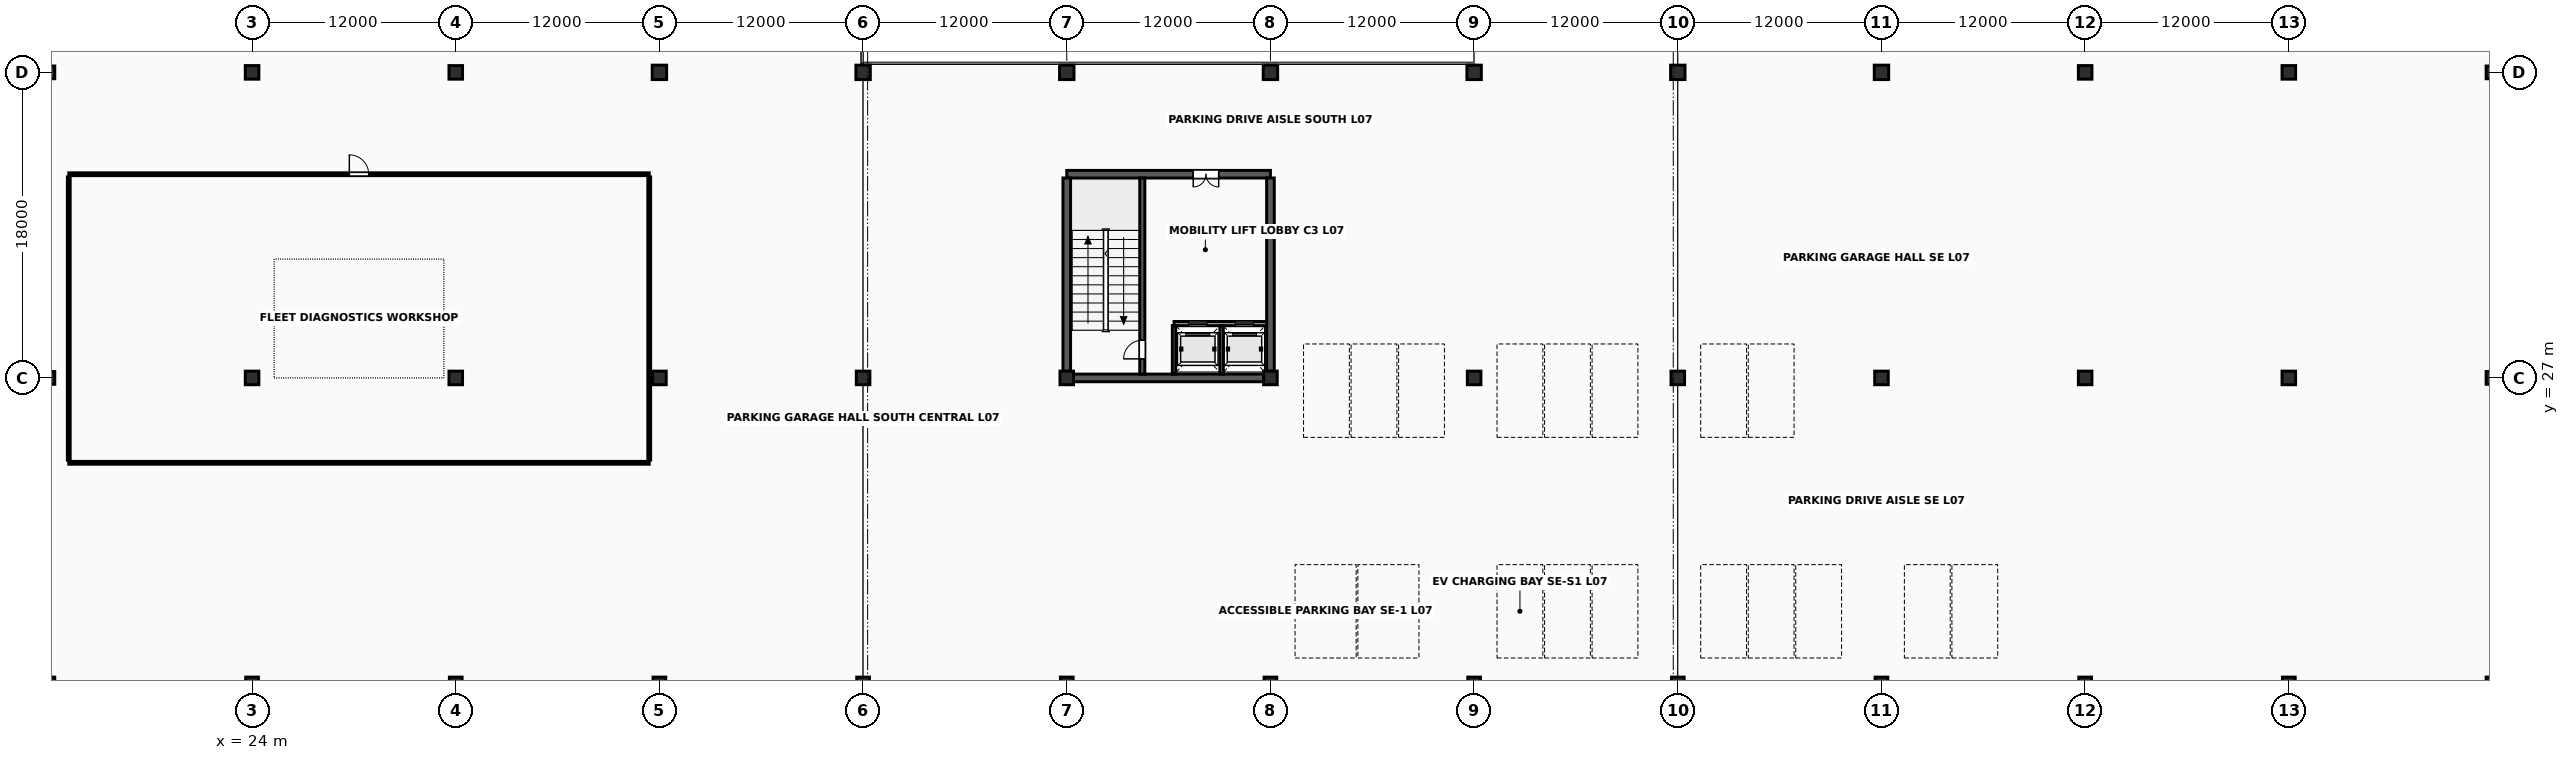
"""IFC4 building model, lengths in metres.
Left out: names, types, materials, properties, quantities, classifications, styles, units other than length and angle.
Written with IfcOpenShell. Run it as: python <this file> out.ifc"""

import sys

from ifc_helpers import new_model, si_unit, direction, frame, frame_2d, origin, origin_2d, place, context, subcontext, project, spatial, rectangle, extrude, element, fill, save


model = new_model("IFC4")
c1 = context("Model", 3, precision=1e-05, world=origin(), true_north=direction((0.0, 1.0)))
c2 = subcontext(c1, "Body", "Model", "MODEL_VIEW")
j1 = project(units=[si_unit("LENGTHUNIT", "METRE"), si_unit("PLANEANGLEUNIT", "RADIAN")], contexts=[c1])
p1 = place(None, origin())
s1 = spatial("IfcSite", under=j1, at=p1, CompositionType="ELEMENT")
p2 = place(p1, origin())
s2 = spatial("IfcBuilding", under=s1, at=p2, CompositionType="ELEMENT")
p3 = place(p2, frame((0.0, 0.0, 28.6)))
s3 = spatial("IfcBuildingStorey", under=s2, at=p3, CompositionType="ELEMENT", Elevation=28.6)
for number, where, z_axis, x_axis in (
    (1, (12.0, 9.0, 0.0), (0.0, 0.0, 1.0), (1.0, 0.0, 0.0)),
    (2, (12.0, 27.0, 0.0), (0.0, 0.0, 1.0), (1.0, 0.0, 0.0)),
    (3, (12.0, 45.0, 0.0), (0.0, 0.0, 1.0), (1.0, 0.0, 0.0)),
    (4, (24.0, 9.0, 0.0), (0.0, 0.0, 1.0), (1.0, 0.0, 0.0)),
):
    element("IfcColumn", number, at=place(p3, frame(where, z_axis=z_axis, x_axis=x_axis)), inside=s3, PredefinedType="COLUMN", context=c2, shape_type="SweptSolid", body=[
        extrude(rectangle(XDim=0.75, YDim=0.75, at=origin_2d()), origin(), (0.0, 0.0, 1.0), 3.8),
    ])
for number, where, z_axis, x_axis in (
    (5, (24.0, 27.0, 0.0), (0.0, 0.0, 1.0), (1.0, 0.0, 0.0)),
    (6, (24.0, 45.0, 0.0), (0.0, 0.0, 1.0), (1.0, 0.0, 0.0)),
):
    element("IfcColumn", number, at=place(p3, frame(where, z_axis=z_axis, x_axis=x_axis)), inside=s3, PredefinedType="COLUMN", context=c2, shape_type="SweptSolid", body=[
        extrude(rectangle(XDim=0.8, YDim=0.8, at=origin_2d()), origin(), (0.0, 0.0, 1.0), 3.8),
    ])
p4 = place(p3, frame((36.0, 9.0, 0.0), z_axis=(0.0, 0.0, 1.0), x_axis=(1.0, 0.0, 0.0)))
e7 = element("IfcColumn", 7, at=p4, inside=s3, PredefinedType="COLUMN", context=c2, shape_type="SweptSolid", body=[
    extrude(rectangle(XDim=0.75, YDim=0.75, at=origin_2d()), origin(), (0.0, 0.0, 1.0), 3.8),
])
for number, where, z_axis, x_axis in (
    (8, (36.0, 27.0, 0.0), (0.0, 0.0, 1.0), (1.0, 0.0, 0.0)),
    (9, (36.0, 45.0, 0.0), (0.0, 0.0, 1.0), (1.0, 0.0, 0.0)),
):
    element("IfcColumn", number, at=place(p3, frame(where, z_axis=z_axis, x_axis=x_axis)), inside=s3, PredefinedType="COLUMN", context=c2, shape_type="SweptSolid", body=[
        extrude(rectangle(XDim=0.8, YDim=0.8, at=origin_2d()), origin(), (0.0, 0.0, 1.0), 3.8),
    ])
p5 = place(p3, frame((48.0, 9.0, 0.0), z_axis=(0.0, 0.0, 1.0), x_axis=(1.0, 0.0, 0.0)))
e10 = element("IfcColumn", 10, at=p5, inside=s3, PredefinedType="COLUMN", context=c2, shape_type="SweptSolid", body=[
    extrude(rectangle(XDim=0.75, YDim=0.75, at=origin_2d()), origin(), (0.0, 0.0, 1.0), 3.8),
])
p6 = place(p3, frame((48.0, 27.0, 0.0), z_axis=(0.0, 0.0, 1.0), x_axis=(1.0, 0.0, 0.0)))
e11 = element("IfcColumn", 11, at=p6, inside=s3, PredefinedType="COLUMN", context=c2, shape_type="SweptSolid", body=[
    extrude(rectangle(XDim=0.8, YDim=0.8, at=origin_2d()), origin(), (0.0, 0.0, 1.0), 3.8),
])
p7 = place(p3, frame((48.0, 45.0, 0.0), z_axis=(0.0, 0.0, 1.0), x_axis=(1.0, 0.0, 0.0)))
e12 = element("IfcColumn", 12, at=p7, inside=s3, PredefinedType="COLUMN", context=c2, shape_type="SweptSolid", body=[
    extrude(rectangle(XDim=0.85, YDim=0.85, at=origin_2d()), origin(), (0.0, 0.0, 1.0), 3.8),
])
p8 = place(p3, frame((60.0, 9.0, 0.0), z_axis=(0.0, 0.0, 1.0), x_axis=(1.0, 0.0, 0.0)))
e13 = element("IfcColumn", 13, at=p8, inside=s3, PredefinedType="COLUMN", context=c2, shape_type="SweptSolid", body=[
    extrude(rectangle(XDim=0.75, YDim=0.75, at=origin_2d()), origin(), (0.0, 0.0, 1.0), 3.8),
])
p9 = place(p3, frame((60.0, 27.0, 0.0), z_axis=(0.0, 0.0, 1.0), x_axis=(1.0, 0.0, 0.0)))
e14 = element("IfcColumn", 14, at=p9, inside=s3, PredefinedType="COLUMN", context=c2, shape_type="SweptSolid", body=[
    extrude(rectangle(XDim=0.8, YDim=0.8, at=origin_2d()), origin(), (0.0, 0.0, 1.0), 3.8),
])
p10 = place(p3, frame((60.0, 45.0, 0.0), z_axis=(0.0, 0.0, 1.0), x_axis=(1.0, 0.0, 0.0)))
e15 = element("IfcColumn", 15, at=p10, inside=s3, PredefinedType="COLUMN", context=c2, shape_type="SweptSolid", body=[
    extrude(rectangle(XDim=0.85, YDim=0.85, at=origin_2d()), origin(), (0.0, 0.0, 1.0), 3.8),
])
p11 = place(p3, frame((72.0, 9.0, 0.0), z_axis=(0.0, 0.0, 1.0), x_axis=(1.0, 0.0, 0.0)))
e16 = element("IfcColumn", 16, at=p11, inside=s3, PredefinedType="COLUMN", context=c2, shape_type="SweptSolid", body=[
    extrude(rectangle(XDim=0.75, YDim=0.75, at=origin_2d()), origin(), (0.0, 0.0, 1.0), 3.8),
])
p12 = place(p3, frame((72.0, 27.0, 0.0), z_axis=(0.0, 0.0, 1.0), x_axis=(1.0, 0.0, 0.0)))
e17 = element("IfcColumn", 17, at=p12, inside=s3, PredefinedType="COLUMN", context=c2, shape_type="SweptSolid", body=[
    extrude(rectangle(XDim=0.8, YDim=0.8, at=origin_2d()), origin(), (0.0, 0.0, 1.0), 3.8),
])
p13 = place(p3, frame((72.0, 45.0, 0.0), z_axis=(0.0, 0.0, 1.0), x_axis=(1.0, 0.0, 0.0)))
e18 = element("IfcColumn", 18, at=p13, inside=s3, PredefinedType="COLUMN", context=c2, shape_type="SweptSolid", body=[
    extrude(rectangle(XDim=0.85, YDim=0.85, at=origin_2d()), origin(), (0.0, 0.0, 1.0), 3.8),
])
p14 = place(p3, frame((84.0, 9.0, 0.0), z_axis=(0.0, 0.0, 1.0), x_axis=(1.0, 0.0, 0.0)))
e19 = element("IfcColumn", 19, at=p14, inside=s3, PredefinedType="COLUMN", context=c2, shape_type="SweptSolid", body=[
    extrude(rectangle(XDim=0.75, YDim=0.75, at=origin_2d()), origin(), (0.0, 0.0, 1.0), 3.8),
])
p15 = place(p3, frame((84.0, 27.0, 0.0), z_axis=(0.0, 0.0, 1.0), x_axis=(1.0, 0.0, 0.0)))
e20 = element("IfcColumn", 20, at=p15, inside=s3, PredefinedType="COLUMN", context=c2, shape_type="SweptSolid", body=[
    extrude(rectangle(XDim=0.8, YDim=0.8, at=origin_2d()), origin(), (0.0, 0.0, 1.0), 3.8),
])
p16 = place(p3, frame((84.0, 45.0, 0.0), z_axis=(0.0, 0.0, 1.0), x_axis=(1.0, 0.0, 0.0)))
e21 = element("IfcColumn", 21, at=p16, inside=s3, PredefinedType="COLUMN", context=c2, shape_type="SweptSolid", body=[
    extrude(rectangle(XDim=0.85, YDim=0.85, at=origin_2d()), origin(), (0.0, 0.0, 1.0), 3.8),
])
p17 = place(p3, frame((96.0, 9.0, 0.0), z_axis=(0.0, 0.0, 1.0), x_axis=(1.0, 0.0, 0.0)))
e22 = element("IfcColumn", 22, at=p17, inside=s3, PredefinedType="COLUMN", context=c2, shape_type="SweptSolid", body=[
    extrude(rectangle(XDim=0.75, YDim=0.75, at=origin_2d()), origin(), (0.0, 0.0, 1.0), 3.8),
])
p18 = place(p3, frame((96.0, 27.0, 0.0), z_axis=(0.0, 0.0, 1.0), x_axis=(1.0, 0.0, 0.0)))
e23 = element("IfcColumn", 23, at=p18, inside=s3, PredefinedType="COLUMN", context=c2, shape_type="SweptSolid", body=[
    extrude(rectangle(XDim=0.8, YDim=0.8, at=origin_2d()), origin(), (0.0, 0.0, 1.0), 3.8),
])
p19 = place(p3, frame((96.0, 45.0, 0.0), z_axis=(0.0, 0.0, 1.0), x_axis=(1.0, 0.0, 0.0)))
e24 = element("IfcColumn", 24, at=p19, inside=s3, PredefinedType="COLUMN", context=c2, shape_type="SweptSolid", body=[
    extrude(rectangle(XDim=0.85, YDim=0.85, at=origin_2d()), origin(), (0.0, 0.0, 1.0), 3.8),
])
p20 = place(p3, frame((108.0, 9.0, 0.0), z_axis=(0.0, 0.0, 1.0), x_axis=(1.0, 0.0, 0.0)))
e25 = element("IfcColumn", 25, at=p20, inside=s3, PredefinedType="COLUMN", context=c2, shape_type="SweptSolid", body=[
    extrude(rectangle(XDim=0.75, YDim=0.75, at=origin_2d()), origin(), (0.0, 0.0, 1.0), 3.8),
])
p21 = place(p3, frame((108.0, 27.0, 0.0), z_axis=(0.0, 0.0, 1.0), x_axis=(1.0, 0.0, 0.0)))
e26 = element("IfcColumn", 26, at=p21, inside=s3, PredefinedType="COLUMN", context=c2, shape_type="SweptSolid", body=[
    extrude(rectangle(XDim=0.8, YDim=0.8, at=origin_2d()), origin(), (0.0, 0.0, 1.0), 3.8),
])
p22 = place(p3, frame((108.0, 45.0, 0.0), z_axis=(0.0, 0.0, 1.0), x_axis=(1.0, 0.0, 0.0)))
e27 = element("IfcColumn", 27, at=p22, inside=s3, PredefinedType="COLUMN", context=c2, shape_type="SweptSolid", body=[
    extrude(rectangle(XDim=0.85, YDim=0.85, at=origin_2d()), origin(), (0.0, 0.0, 1.0), 3.8),
])
p23 = place(p3, frame((120.0, 9.0, 0.0), z_axis=(0.0, 0.0, 1.0), x_axis=(1.0, 0.0, 0.0)))
e28 = element("IfcColumn", 28, at=p23, inside=s3, PredefinedType="COLUMN", context=c2, shape_type="SweptSolid", body=[
    extrude(rectangle(XDim=0.75, YDim=0.75, at=origin_2d()), origin(), (0.0, 0.0, 1.0), 3.8),
])
p24 = place(p3, frame((120.0, 27.0, 0.0), z_axis=(0.0, 0.0, 1.0), x_axis=(1.0, 0.0, 0.0)))
e29 = element("IfcColumn", 29, at=p24, inside=s3, PredefinedType="COLUMN", context=c2, shape_type="SweptSolid", body=[
    extrude(rectangle(XDim=0.8, YDim=0.8, at=origin_2d()), origin(), (0.0, 0.0, 1.0), 3.8),
])
p25 = place(p3, frame((120.0, 45.0, 0.0), z_axis=(0.0, 0.0, 1.0), x_axis=(1.0, 0.0, 0.0)))
e30 = element("IfcColumn", 30, at=p25, inside=s3, PredefinedType="COLUMN", context=c2, shape_type="SweptSolid", body=[
    extrude(rectangle(XDim=0.85, YDim=0.85, at=origin_2d()), origin(), (0.0, 0.0, 1.0), 3.8),
])
p26 = place(p3, frame((132.0, 9.0, 0.0), z_axis=(0.0, 0.0, 1.0), x_axis=(1.0, 0.0, 0.0)))
e31 = element("IfcColumn", 31, at=p26, inside=s3, PredefinedType="COLUMN", context=c2, shape_type="SweptSolid", body=[
    extrude(rectangle(XDim=0.75, YDim=0.75, at=origin_2d()), origin(), (0.0, 0.0, 1.0), 3.8),
])
for number, where, z_axis, x_axis in (
    (32, (132.0, 27.0, 0.0), (0.0, 0.0, 1.0), (1.0, 0.0, 0.0)),
    (33, (132.0, 45.0, 0.0), (0.0, 0.0, 1.0), (1.0, 0.0, 0.0)),
):
    element("IfcColumn", number, at=place(p3, frame(where, z_axis=z_axis, x_axis=x_axis)), inside=s3, PredefinedType="COLUMN", context=c2, shape_type="SweptSolid", body=[
        extrude(rectangle(XDim=0.8, YDim=0.8, at=origin_2d()), origin(), (0.0, 0.0, 1.0), 3.8),
    ])
p27 = place(p3, frame((144.0, 9.0, 0.0), z_axis=(0.0, 0.0, 1.0), x_axis=(1.0, 0.0, 0.0)))
e34 = element("IfcColumn", 34, at=p27, inside=s3, PredefinedType="COLUMN", context=c2, shape_type="SweptSolid", body=[
    extrude(rectangle(XDim=0.75, YDim=0.75, at=origin_2d()), origin(), (0.0, 0.0, 1.0), 3.8),
])
for number, where, z_axis, x_axis in (
    (35, (144.0, 27.0, 0.0), (0.0, 0.0, 1.0), (1.0, 0.0, 0.0)),
    (36, (144.0, 45.0, 0.0), (0.0, 0.0, 1.0), (1.0, 0.0, 0.0)),
):
    element("IfcColumn", number, at=place(p3, frame(where, z_axis=z_axis, x_axis=x_axis)), inside=s3, PredefinedType="COLUMN", context=c2, shape_type="SweptSolid", body=[
        extrude(rectangle(XDim=0.8, YDim=0.8, at=origin_2d()), origin(), (0.0, 0.0, 1.0), 3.8),
    ])
for number, where, z_axis, x_axis in (
    (37, (156.0, 9.0, 0.0), (0.0, 0.0, 1.0), (1.0, 0.0, 0.0)),
    (38, (156.0, 27.0, 0.0), (0.0, 0.0, 1.0), (1.0, 0.0, 0.0)),
    (39, (156.0, 45.0, 0.0), (0.0, 0.0, 1.0), (1.0, 0.0, 0.0)),
):
    element("IfcColumn", number, at=place(p3, frame(where, z_axis=z_axis, x_axis=x_axis)), inside=s3, PredefinedType="COLUMN", context=c2, shape_type="SweptSolid", body=[
        extrude(rectangle(XDim=0.75, YDim=0.75, at=origin_2d()), origin(), (0.0, 0.0, 1.0), 3.8),
    ])
p28 = place(p3, frame((72.397, 27.0, 0.0), z_axis=(0.0, 0.0, 1.0), x_axis=(1.0, 0.0, 0.0)))
e40 = element("IfcWall", 40, at=p28, inside=s3, PredefinedType="SHEAR", context=c2, shape_type="SweptSolid", body=[
    extrude(rectangle(XDim=11.206, YDim=0.45, at=frame_2d((5.603, 0.0))), origin(), (0.0, 0.0, 1.0), 3.553),
])
p29 = place(p3, frame((72.0, 39.0, 0.0), z_axis=(0.0, 0.0, 1.0), x_axis=(1.0, 0.0, 0.0)))
e41 = element("IfcWall", 41, at=p29, inside=s3, PredefinedType="SHEAR", context=c2, shape_type="SweptSolid", body=[
    extrude(rectangle(XDim=12.0, YDim=0.45, at=frame_2d((6.0, 0.0))), origin(), (0.0, 0.0, 1.0), 3.553),
])
p30 = place(p29, frame((7.45, 0.0, 0.0)))
e42 = element("IfcOpeningElement", 42, at=p30, cuts=e41, PredefinedType="OPENING", context=c2, shape_type="SweptSolid", body=[
    extrude(rectangle(XDim=1.5, YDim=2.25, at=frame_2d((0.75, 1.125))), frame((0.0, 0.24, 0.0), z_axis=(0.0, -1.0, 0.0), x_axis=(1.0, 0.0, 0.0)), (0.0, 0.0, 1.0), 0.48),
])
for number, where, z_axis, x_axis in (
    (43, (72.0, 27.397, 0.0), (0.0, 0.0, 1.0), (0.0, 1.0, 0.0)),
    (44, (84.0, 27.397, 0.0), (0.0, 0.0, 1.0), (0.0, 1.0, 0.0)),
):
    element("IfcWall", number, at=place(p3, frame(where, z_axis=z_axis, x_axis=x_axis)), inside=s3, PredefinedType="SHEAR", context=c2, shape_type="SweptSolid", body=[
        extrude(rectangle(XDim=11.381, YDim=0.45, at=frame_2d((5.69, 0.0))), origin(), (0.0, 0.0, 1.0), 3.553),
    ])
p31 = place(p3, frame((76.45, 27.222, 0.0), z_axis=(0.0, 0.0, 1.0), x_axis=(0.0, 1.0, 0.0)))
e45 = element("IfcWall", 45, at=p31, inside=s3, PredefinedType="SHEAR", context=c2, shape_type="SweptSolid", body=[
    extrude(rectangle(XDim=11.556, YDim=0.3, at=frame_2d((5.778, 0.0))), origin(), (0.0, 0.0, 1.0), 3.553),
])
p32 = place(p31, frame((0.9, 0.0, 0.0)))
e46 = element("IfcOpeningElement", 46, at=p32, cuts=e45, PredefinedType="OPENING", context=c2, shape_type="SweptSolid", body=[
    extrude(rectangle(XDim=1.1, YDim=2.2, at=frame_2d((0.55, 1.1))), frame((0.0, 0.165, 0.0), z_axis=(0.0, -1.0, 0.0), x_axis=(1.0, 0.0, 0.0)), (0.0, 0.0, 1.0), 0.33),
])
p33 = place(p3, frame((78.32, 30.2, 0.0), z_axis=(0.0, 0.0, 1.0), x_axis=(1.0, 0.0, 0.0)))
e47 = element("IfcWall", 47, at=p33, inside=s3, PredefinedType="SOLIDWALL", context=c2, shape_type="SweptSolid", body=[
    extrude(rectangle(XDim=5.458, YDim=0.25, at=frame_2d((2.729, 0.0))), origin(), (0.0, 0.0, 1.0), 3.553),
])
p34 = place(p33, frame((0.86, 0.0, 0.0)))
e48 = element("IfcOpeningElement", 48, at=p34, cuts=e47, PredefinedType="OPENING", context=c2, shape_type="SweptSolid", body=[
    extrude(rectangle(XDim=1.08, YDim=2.22, at=frame_2d((0.54, 1.11))), frame((0.0, 0.14, 0.0), z_axis=(0.0, -1.0, 0.0), x_axis=(1.0, 0.0, 0.0)), (0.0, 0.0, 1.0), 0.28),
])
p35 = place(p33, frame((3.61, 0.0, 0.0)))
e49 = element("IfcOpeningElement", 49, at=p35, cuts=e47, PredefinedType="OPENING", context=c2, shape_type="SweptSolid", body=[
    extrude(rectangle(XDim=1.08, YDim=2.22, at=frame_2d((0.54, 1.11))), frame((0.0, 0.14, 0.0), z_axis=(0.0, -1.0, 0.0), x_axis=(1.0, 0.0, 0.0)), (0.0, 0.0, 1.0), 0.28),
])
for number, where, z_axis, x_axis in (
    (50, (78.32, 27.225, 0.0), (0.0, 0.0, 1.0), (0.0, 1.0, 0.0)),
    (51, (81.12, 27.225, 0.0), (0.0, 0.0, 1.0), (0.0, 1.0, 0.0)),
):
    element("IfcWall", number, at=place(p3, frame(where, z_axis=z_axis, x_axis=x_axis)), inside=s3, PredefinedType="SOLIDWALL", context=c2, shape_type="SweptSolid", body=[
        extrude(rectangle(XDim=2.855, YDim=0.2, at=frame_2d((1.427, 0.0))), origin(), (0.0, 0.0, 1.0), 3.543),
    ])
p36 = place(p3, frame((13.2, 22.0, 0.0), z_axis=(0.0, 0.0, 1.0), x_axis=(1.0, 0.0, 0.0)))
e52 = element("IfcWall", 52, at=p36, inside=s3, PredefinedType="PARTITIONING", context=c2, shape_type="SweptSolid", body=[
    extrude(rectangle(XDim=34.2, YDim=0.165, at=frame_2d((17.1, 0.0))), origin(), (0.0, 0.0, 1.0), 2.64),
])
p37 = place(p3, frame((13.2, 39.0, 0.0), z_axis=(0.0, 0.0, 1.0), x_axis=(1.0, 0.0, 0.0)))
e53 = element("IfcWall", 53, at=p37, inside=s3, PredefinedType="PARTITIONING", context=c2, shape_type="SweptSolid", body=[
    extrude(rectangle(XDim=34.2, YDim=0.165, at=frame_2d((17.1, 0.0))), origin(), (0.0, 0.0, 1.0), 2.64),
])
p38 = place(p37, frame((16.53, 0.0, 0.0)))
e54 = element("IfcOpeningElement", 54, at=p38, cuts=e53, PredefinedType="OPENING", context=c2, shape_type="SweptSolid", body=[
    extrude(rectangle(XDim=1.14, YDim=2.24, at=frame_2d((0.57, 1.12))), frame((0.0, 0.097, 0.0), z_axis=(0.0, -1.0, 0.0), x_axis=(1.0, 0.0, 0.0)), (0.0, 0.0, 1.0), 0.195),
])
for number, where, z_axis, x_axis in (
    (55, (13.2, 22.16, 0.0), (0.0, 0.0, 1.0), (0.0, 1.0, 0.0)),
    (56, (47.4, 22.16, 0.0), (0.0, 0.0, 1.0), (0.0, 1.0, 0.0)),
):
    element("IfcWall", number, at=place(p3, frame(where, z_axis=z_axis, x_axis=x_axis)), inside=s3, PredefinedType="PARTITIONING", context=c2, shape_type="SweptSolid", body=[
        extrude(rectangle(XDim=16.68, YDim=0.165, at=frame_2d((8.34, 0.0))), origin(), (0.0, 0.0, 1.0), 2.64),
    ])
p39 = place(p32, origin())
e57 = element("IfcDoor", 57, at=p39, inside=s3, OperationType="SINGLE_SWING_LEFT", PredefinedType="DOOR", context=c2, shape_type="SweptSolid", body=[
    extrude(rectangle(XDim=1.1, YDim=2.2, at=frame_2d((0.55, 1.1))), frame((0.0, 0.025, 0.0), z_axis=(0.0, -1.0, 0.0), x_axis=(1.0, 0.0, 0.0)), (0.0, 0.0, 1.0), 0.05),
])
fill(e46, e57)
p40 = place(p30, origin())
e58 = element("IfcDoor", 58, at=p40, inside=s3, OperationType="DOUBLE_DOOR_SINGLE_SWING", PredefinedType="DOOR", context=c2, shape_type="SweptSolid", body=[
    extrude(rectangle(XDim=1.5, YDim=2.25, at=frame_2d((0.75, 1.125))), frame((0.0, 0.025, 0.0), z_axis=(0.0, -1.0, 0.0), x_axis=(1.0, 0.0, 0.0)), (0.0, 0.0, 1.0), 0.05),
])
fill(e42, e58)
p41 = place(p34, origin())
e59 = element("IfcDoor", 59, at=p41, inside=s3, OperationType="SLIDING_TO_LEFT", PredefinedType="USERDEFINED", context=c2, shape_type="SweptSolid", body=[
    extrude(rectangle(XDim=1.08, YDim=2.22, at=frame_2d((0.54, 1.11))), frame((0.0, 0.025, 0.0), z_axis=(0.0, -1.0, 0.0), x_axis=(1.0, 0.0, 0.0)), (0.0, 0.0, 1.0), 0.05),
])
fill(e48, e59)
p42 = place(p35, origin())
e60 = element("IfcDoor", 60, at=p42, inside=s3, OperationType="SLIDING_TO_LEFT", PredefinedType="USERDEFINED", context=c2, shape_type="SweptSolid", body=[
    extrude(rectangle(XDim=1.08, YDim=2.22, at=frame_2d((0.54, 1.11))), frame((0.0, 0.025, 0.0), z_axis=(0.0, -1.0, 0.0), x_axis=(1.0, 0.0, 0.0)), (0.0, 0.0, 1.0), 0.05),
])
fill(e49, e60)
p43 = place(p38, origin())
e61 = element("IfcDoor", 61, at=p43, inside=s3, OperationType="SINGLE_SWING_LEFT", PredefinedType="DOOR", context=c2, shape_type="SweptSolid", body=[
    extrude(rectangle(XDim=1.14, YDim=2.24, at=frame_2d((0.57, 1.12))), frame((0.0, 0.025, 0.0), z_axis=(0.0, -1.0, 0.0), x_axis=(1.0, 0.0, 0.0)), (0.0, 0.0, 1.0), 0.05),
])
fill(e54, e61)
save(model, sys.argv[1])
